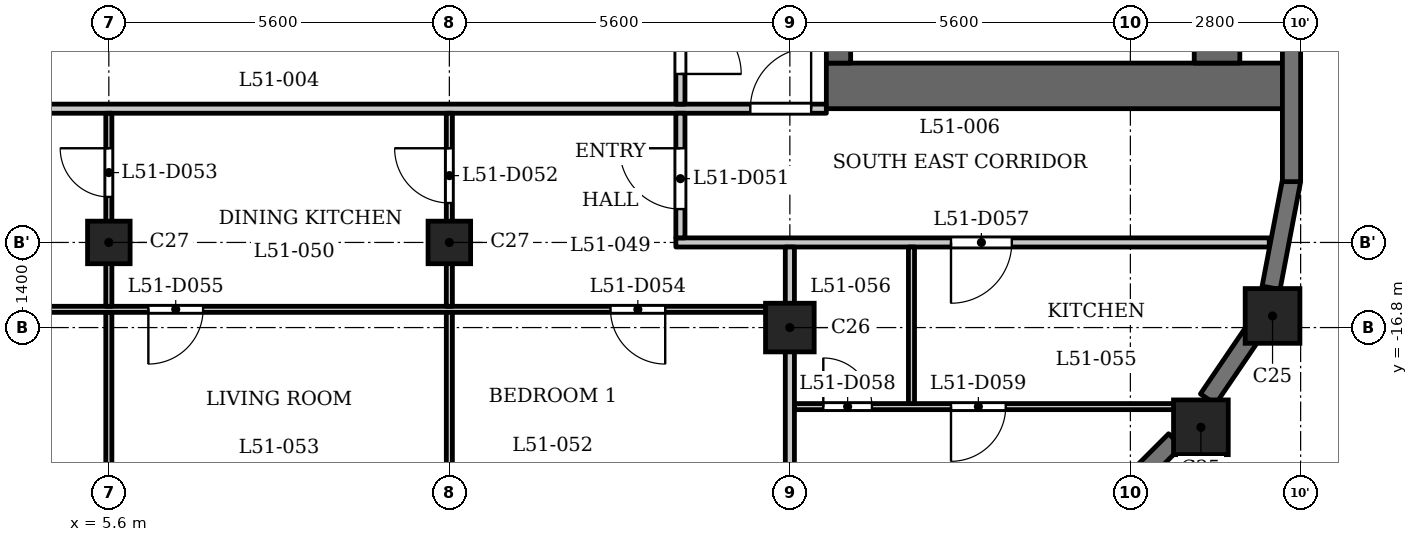
"""IFC4 building model, lengths in metres.
Left out: names, types, materials, properties, quantities, classifications, styles, units other than length and angle.
Written with IfcOpenShell. Run it as: python <this file> out.ifc"""

import sys

from ifc_helpers import new_model, si_unit, direction, frame, frame_2d, origin, origin_2d, place, context, subcontext, project, spatial, rectangle, extrude, element, fill, save


model = new_model("IFC4")
c1 = context("Model", 3, precision=1e-05, world=origin(), true_north=direction((0.0, 1.0)))
c2 = subcontext(c1, "Body", "Model", "MODEL_VIEW")
j1 = project(units=[si_unit("LENGTHUNIT", "METRE"), si_unit("PLANEANGLEUNIT", "RADIAN")], contexts=[c1])
p1 = place(None, origin())
s1 = spatial("IfcSite", under=j1, at=p1, CompositionType="ELEMENT")
p2 = place(p1, origin())
s2 = spatial("IfcBuilding", under=s1, at=p2, CompositionType="ELEMENT")
p3 = place(p2, frame((0.0, 0.0, 199.4)))
s3 = spatial("IfcBuildingStorey", under=s2, at=p3, CompositionType="ELEMENT", Elevation=199.4)
for number, where, z_axis, x_axis in (
    (1, (23.56, -18.44, 0.0), (0.0, 0.0, 1.0), (1.0, 0.0, 0.0)),
    (2, (24.738, -16.609, 0.0), (0.0, 0.0, 1.0), (1.0, 0.0, 0.0)),
):
    element("IfcColumn", number, at=place(p3, frame(where, z_axis=z_axis, x_axis=x_axis)), inside=s3, PredefinedType="COLUMN", context=c2, shape_type="SweptSolid", body=[
        extrude(rectangle(XDim=0.9, YDim=0.9, at=origin_2d()), origin(), (0.0, 0.0, 1.0), 3.5),
    ])
p4 = place(p3, frame((16.8, -16.8, 0.0), z_axis=(0.0, 0.0, 1.0), x_axis=(1.0, 0.0, 0.0)))
e3 = element("IfcColumn", 3, at=p4, inside=s3, PredefinedType="COLUMN", context=c2, shape_type="SweptSolid", body=[
    extrude(rectangle(XDim=0.8, YDim=0.8, at=origin_2d()), origin(), (0.0, 0.0, 1.0), 3.5),
])
for number, where, z_axis, x_axis in (
    (4, (5.6, -15.4, 0.0), (0.0, 0.0, 1.0), (1.0, 0.0, 0.0)),
    (5, (11.2, -15.4, 0.0), (0.0, 0.0, 1.0), (1.0, 0.0, 0.0)),
):
    element("IfcColumn", number, at=place(p3, frame(where, z_axis=z_axis, x_axis=x_axis)), inside=s3, PredefinedType="COLUMN", context=c2, shape_type="SweptSolid", body=[
        extrude(rectangle(XDim=0.7, YDim=0.7, at=origin_2d()), origin(), (0.0, 0.0, 1.0), 3.5),
    ])
p5 = place(p3, frame((21.191, -20.597, 0.0), z_axis=(0.0, 0.0, 1.0), x_axis=(0.707106781187, 0.707106781187, 0.0)))
e6 = element("IfcWall", 6, at=p5, inside=s3, PredefinedType="SOLIDWALL", context=c2, shape_type="SweptSolid", body=[
    extrude(rectangle(XDim=2.75, YDim=0.3, at=frame_2d((1.375, 0.0))), origin(), (0.0, 0.0, 1.0), 2.5),
])
p6 = place(p5, frame((0.775, 0.0, 0.6)))
e7 = element("IfcOpeningElement", 7, at=p6, cuts=e6, PredefinedType="OPENING", context=c2, shape_type="SweptSolid", body=[
    extrude(rectangle(XDim=1.2, YDim=1.55, at=frame_2d((0.6, 0.775))), frame((0.0, 0.16, 0.0), z_axis=(0.0, -1.0, 0.0), x_axis=(1.0, 0.0, 0.0)), (0.0, 0.0, 1.0), 0.32),
])
p7 = place(p3, frame((23.676, -17.975, 0.0), z_axis=(0.0, 0.0, 1.0), x_axis=(0.56200149592, 0.827136215253, 0.0)))
e8 = element("IfcWall", 8, at=p7, inside=s3, PredefinedType="SOLIDWALL", context=c2, shape_type="SweptSolid", body=[
    extrude(rectangle(XDim=1.277, YDim=0.3, at=frame_2d((0.639, 0.0))), origin(), (0.0, 0.0, 1.0), 2.5),
])
p8 = place(p3, frame((24.714, -16.146, 0.0), z_axis=(0.0, 0.0, 1.0), x_axis=(0.187348135549, 0.982293579388, 0.0)))
e9 = element("IfcWall", 9, at=p8, inside=s3, PredefinedType="SOLIDWALL", context=c2, shape_type="SweptSolid", body=[
    extrude(rectangle(XDim=1.806, YDim=0.3, at=frame_2d((0.903, 0.0))), origin(), (0.0, 0.0, 1.0), 2.5),
])
p9 = place(p3, frame((25.05, -14.4, 0.0), z_axis=(0.0, 0.0, 1.0), x_axis=(0.0, 1.0, 0.0)))
e10 = element("IfcWall", 10, at=p9, inside=s3, PredefinedType="SOLIDWALL", context=c2, shape_type="SweptSolid", body=[
    extrude(rectangle(XDim=2.75, YDim=0.3, at=frame_2d((1.375, 0.0))), origin(), (0.0, 0.0, 1.0), 2.5),
])
p10 = place(p3, frame((17.4, -12.825, 0.0), z_axis=(0.0, 0.0, 1.0), x_axis=(1.0, 0.0, 0.0)))
e11 = element("IfcWall", 11, at=p10, inside=s3, PredefinedType="SHEAR", context=c2, shape_type="SweptSolid", body=[
    extrude(rectangle(XDim=7.6, YDim=0.75, at=frame_2d((3.8, 0.0))), origin(), (0.0, 0.0, 1.0), 3.2),
])
p11 = place(p3, frame((17.6, -12.45, 0.0), z_axis=(0.0, 0.0, 1.0), x_axis=(0.0, 1.0, 0.0)))
e12 = element("IfcWall", 12, at=p11, inside=s3, PredefinedType="SHEAR", context=c2, shape_type="SweptSolid", body=[
    extrude(rectangle(XDim=24.9, YDim=0.4, at=frame_2d((12.45, 0.0))), origin(), (0.0, 0.0, 1.0), 3.2),
])
p12 = place(p11, frame((8.65, 0.0, 0.0)))
e13 = element("IfcOpeningElement", 13, at=p12, cuts=e12, PredefinedType="OPENING", context=c2, shape_type="SweptSolid", body=[
    extrude(rectangle(XDim=0.9, YDim=2.1, at=frame_2d((0.45, 1.05))), frame((0.0, 0.21, 0.0), z_axis=(0.0, -1.0, 0.0), x_axis=(1.0, 0.0, 0.0)), (0.0, 0.0, 1.0), 0.42),
])
p13 = place(p11, frame((15.6, 0.0, 0.0)))
e14 = element("IfcOpeningElement", 14, at=p13, cuts=e12, PredefinedType="OPENING", context=c2, shape_type="SweptSolid", body=[
    extrude(rectangle(XDim=1.1, YDim=2.1, at=frame_2d((0.55, 1.05))), frame((0.0, 0.21, 0.0), z_axis=(0.0, -1.0, 0.0), x_axis=(1.0, 0.0, 0.0)), (0.0, 0.0, 1.0), 0.42),
])
p14 = place(p11, frame((18.0, 0.0, 0.0)))
e15 = element("IfcOpeningElement", 15, at=p14, cuts=e12, PredefinedType="OPENING", context=c2, shape_type="SweptSolid", body=[
    extrude(rectangle(XDim=1.1, YDim=2.1, at=frame_2d((0.55, 1.05))), frame((0.0, 0.21, 0.0), z_axis=(0.0, -1.0, 0.0), x_axis=(1.0, 0.0, 0.0)), (0.0, 0.0, 1.0), 0.42),
])
p15 = place(p11, frame((23.025, 0.0, 0.0)))
e16 = element("IfcOpeningElement", 16, at=p15, cuts=e12, PredefinedType="OPENING", context=c2, shape_type="SweptSolid", body=[
    extrude(rectangle(XDim=1.1, YDim=2.1, at=frame_2d((0.55, 1.05))), frame((0.0, 0.21, 0.0), z_axis=(0.0, -1.0, 0.0), x_axis=(1.0, 0.0, 0.0)), (0.0, 0.0, 1.0), 0.42),
])
p16 = place(p11, frame((0.775, 0.0, 0.0)))
e17 = element("IfcOpeningElement", 17, at=p16, cuts=e12, PredefinedType="OPENING", context=c2, shape_type="SweptSolid", body=[
    extrude(rectangle(XDim=1.1, YDim=2.1, at=frame_2d((0.55, 1.05))), frame((0.0, 0.21, 0.0), z_axis=(0.0, -1.0, 0.0), x_axis=(1.0, 0.0, 0.0)), (0.0, 0.0, 1.0), 0.42),
])
p17 = place(p11, frame((12.925, 0.0, 0.0)))
e18 = element("IfcOpeningElement", 18, at=p17, cuts=e12, PredefinedType="OPENING", context=c2, shape_type="SweptSolid", body=[
    extrude(rectangle(XDim=1.8, YDim=2.1, at=frame_2d((0.9, 1.05))), frame((0.0, 0.21, 0.0), z_axis=(0.0, -1.0, 0.0), x_axis=(1.0, 0.0, 0.0)), (0.0, 0.0, 1.0), 0.42),
])
p18 = place(p3, frame((23.825, -12.45, 0.0), z_axis=(0.0, 0.0, 1.0), x_axis=(0.0, 1.0, 0.0)))
e19 = element("IfcWall", 19, at=p18, inside=s3, PredefinedType="SHEAR", context=c2, shape_type="SweptSolid", body=[
    extrude(rectangle(XDim=24.9, YDim=0.75, at=frame_2d((12.45, 0.0))), origin(), (0.0, 0.0, 1.0), 3.2),
])
p19 = place(p3, frame((16.875, -18.1, 0.0), z_axis=(0.0, 0.0, 1.0), x_axis=(1.0, 0.0, 0.0)))
e20 = element("IfcWall", 20, at=p19, inside=s3, PredefinedType="PARTITIONING", context=c2, shape_type="SweptSolid", body=[
    extrude(rectangle(XDim=6.765, YDim=0.1, at=frame_2d((3.382, 0.0))), origin(), (0.0, 0.0, 1.0), 3.2),
])
p20 = place(p19, frame((0.475, 0.0, 0.0)))
e21 = element("IfcOpeningElement", 21, at=p20, cuts=e20, PredefinedType="OPENING", context=c2, shape_type="SweptSolid", body=[
    extrude(rectangle(XDim=0.8, YDim=2.1, at=frame_2d((0.4, 1.05))), frame((0.0, 0.06, 0.0), z_axis=(0.0, -1.0, 0.0), x_axis=(1.0, 0.0, 0.0)), (0.0, 0.0, 1.0), 0.12),
])
p21 = place(p19, frame((2.575, 0.0, 0.0)))
e22 = element("IfcOpeningElement", 22, at=p21, cuts=e20, PredefinedType="OPENING", context=c2, shape_type="SweptSolid", body=[
    extrude(rectangle(XDim=0.9, YDim=2.1, at=frame_2d((0.45, 1.05))), frame((0.0, 0.06, 0.0), z_axis=(0.0, -1.0, 0.0), x_axis=(1.0, 0.0, 0.0)), (0.0, 0.0, 1.0), 0.12),
])
p22 = place(p3, frame((-16.725, -16.5, 0.0), z_axis=(0.0, 0.0, 1.0), x_axis=(1.0, 0.0, 0.0)))
e23 = element("IfcWall", 23, at=p22, inside=s3, PredefinedType="PARTITIONING", context=c2, shape_type="SweptSolid", body=[
    extrude(rectangle(XDim=33.45, YDim=0.1, at=frame_2d((16.725, 0.0))), origin(), (0.0, 0.0, 1.0), 3.2),
])
p23 = place(p22, frame((4.075, 0.0, 0.0)))
e24 = element("IfcOpeningElement", 24, at=p23, cuts=e23, PredefinedType="OPENING", context=c2, shape_type="SweptSolid", body=[
    extrude(rectangle(XDim=0.9, YDim=2.1, at=frame_2d((0.45, 1.05))), frame((0.0, 0.06, 0.0), z_axis=(0.0, -1.0, 0.0), x_axis=(1.0, 0.0, 0.0)), (0.0, 0.0, 1.0), 0.12),
])
p24 = place(p22, frame((6.175, 0.0, 0.0)))
e25 = element("IfcOpeningElement", 25, at=p24, cuts=e23, PredefinedType="OPENING", context=c2, shape_type="SweptSolid", body=[
    extrude(rectangle(XDim=0.9, YDim=2.1, at=frame_2d((0.45, 1.05))), frame((0.0, 0.06, 0.0), z_axis=(0.0, -1.0, 0.0), x_axis=(1.0, 0.0, 0.0)), (0.0, 0.0, 1.0), 0.12),
])
p25 = place(p22, frame((30.575, 0.0, 0.0)))
e26 = element("IfcOpeningElement", 26, at=p25, cuts=e23, PredefinedType="OPENING", context=c2, shape_type="SweptSolid", body=[
    extrude(rectangle(XDim=0.9, YDim=2.1, at=frame_2d((0.45, 1.05))), frame((0.0, 0.06, 0.0), z_axis=(0.0, -1.0, 0.0), x_axis=(1.0, 0.0, 0.0)), (0.0, 0.0, 1.0), 0.12),
])
p26 = place(p22, frame((22.975, 0.0, 0.0)))
e27 = element("IfcOpeningElement", 27, at=p26, cuts=e23, PredefinedType="OPENING", context=c2, shape_type="SweptSolid", body=[
    extrude(rectangle(XDim=0.9, YDim=2.1, at=frame_2d((0.45, 1.05))), frame((0.0, 0.06, 0.0), z_axis=(0.0, -1.0, 0.0), x_axis=(1.0, 0.0, 0.0)), (0.0, 0.0, 1.0), 0.12),
])
p27 = place(p3, frame((14.925, -15.4, 0.0), z_axis=(0.0, 0.0, 1.0), x_axis=(1.0, 0.0, 0.0)))
e28 = element("IfcWall", 28, at=p27, inside=s3, PredefinedType="PARTITIONING", context=c2, shape_type="SweptSolid", body=[
    extrude(rectangle(XDim=9.759, YDim=0.15, at=frame_2d((4.879, 0.0))), origin(), (0.0, 0.0, 1.0), 3.2),
])
p28 = place(p27, frame((4.525, 0.0, 0.0)))
e29 = element("IfcOpeningElement", 29, at=p28, cuts=e28, PredefinedType="OPENING", context=c2, shape_type="SweptSolid", body=[
    extrude(rectangle(XDim=1.0, YDim=2.1, at=frame_2d((0.5, 1.05))), frame((0.0, 0.085, 0.0), z_axis=(0.0, -1.0, 0.0), x_axis=(1.0, 0.0, 0.0)), (0.0, 0.0, 1.0), 0.17),
])
p29 = place(p3, frame((-17.4, -13.2, 0.0), z_axis=(0.0, 0.0, 1.0), x_axis=(1.0, 0.0, 0.0)))
e30 = element("IfcWall", 30, at=p29, inside=s3, PredefinedType="PARTITIONING", context=c2, shape_type="SweptSolid", body=[
    extrude(rectangle(XDim=34.8, YDim=0.15, at=frame_2d((17.4, 0.0))), origin(), (0.0, 0.0, 1.0), 3.2),
])
p30 = place(p29, frame((0.15, 0.0, 0.0)))
e31 = element("IfcOpeningElement", 31, at=p30, cuts=e30, PredefinedType="OPENING", context=c2, shape_type="SweptSolid", body=[
    extrude(rectangle(XDim=1.0, YDim=2.1, at=frame_2d((0.5, 1.05))), frame((0.0, 0.085, 0.0), z_axis=(0.0, -1.0, 0.0), x_axis=(1.0, 0.0, 0.0)), (0.0, 0.0, 1.0), 0.17),
])
p31 = place(p29, frame((33.55, 0.0, 0.0)))
e32 = element("IfcOpeningElement", 32, at=p31, cuts=e30, PredefinedType="OPENING", context=c2, shape_type="SweptSolid", body=[
    extrude(rectangle(XDim=1.0, YDim=2.1, at=frame_2d((0.5, 1.05))), frame((0.0, 0.085, 0.0), z_axis=(0.0, -1.0, 0.0), x_axis=(1.0, 0.0, 0.0)), (0.0, 0.0, 1.0), 0.17),
])
p32 = place(p3, frame((5.6, -22.08, 0.0), z_axis=(0.0, 0.0, 1.0), x_axis=(0.0, 1.0, 0.0)))
e33 = element("IfcWall", 33, at=p32, inside=s3, PredefinedType="PARTITIONING", context=c2, shape_type="SweptSolid", body=[
    extrude(rectangle(XDim=5.53, YDim=0.1, at=frame_2d((2.765, 0.0))), origin(), (0.0, 0.0, 1.0), 3.2),
])
p33 = place(p32, frame((0.28, 0.0, 0.0)))
e34 = element("IfcOpeningElement", 34, at=p33, cuts=e33, PredefinedType="OPENING", context=c2, shape_type="SweptSolid", body=[
    extrude(rectangle(XDim=0.9, YDim=2.1, at=frame_2d((0.45, 1.05))), frame((0.0, 0.06, 0.0), z_axis=(0.0, -1.0, 0.0), x_axis=(1.0, 0.0, 0.0)), (0.0, 0.0, 1.0), 0.12),
])
p34 = place(p3, frame((5.6, -16.45, 0.0), z_axis=(0.0, 0.0, 1.0), x_axis=(0.0, 1.0, 0.0)))
e35 = element("IfcWall", 35, at=p34, inside=s3, PredefinedType="PARTITIONING", context=c2, shape_type="SweptSolid", body=[
    extrude(rectangle(XDim=3.175, YDim=0.1, at=frame_2d((1.587, 0.0))), origin(), (0.0, 0.0, 1.0), 3.2),
])
p35 = place(p34, frame((1.799, 0.0, 0.0)))
e36 = element("IfcOpeningElement", 36, at=p35, cuts=e35, PredefinedType="OPENING", context=c2, shape_type="SweptSolid", body=[
    extrude(rectangle(XDim=0.8, YDim=2.1, at=frame_2d((0.4, 1.05))), frame((0.0, 0.06, 0.0), z_axis=(0.0, -1.0, 0.0), x_axis=(1.0, 0.0, 0.0)), (0.0, 0.0, 1.0), 0.12),
])
p36 = place(p3, frame((11.2, -22.08, 0.0), z_axis=(0.0, 0.0, 1.0), x_axis=(0.0, 1.0, 0.0)))
e37 = element("IfcWall", 37, at=p36, inside=s3, PredefinedType="PARTITIONING", context=c2, shape_type="SweptSolid", body=[
    extrude(rectangle(XDim=5.53, YDim=0.1, at=frame_2d((2.765, 0.0))), origin(), (0.0, 0.0, 1.0), 3.2),
])
p37 = place(p3, frame((11.2, -16.45, 0.0), z_axis=(0.0, 0.0, 1.0), x_axis=(0.0, 1.0, 0.0)))
e38 = element("IfcWall", 38, at=p37, inside=s3, PredefinedType="PARTITIONING", context=c2, shape_type="SweptSolid", body=[
    extrude(rectangle(XDim=3.175, YDim=0.1, at=frame_2d((1.587, 0.0))), origin(), (0.0, 0.0, 1.0), 3.2),
])
p38 = place(p37, frame((1.699, 0.0, 0.0)))
e39 = element("IfcOpeningElement", 39, at=p38, cuts=e38, PredefinedType="OPENING", context=c2, shape_type="SweptSolid", body=[
    extrude(rectangle(XDim=0.9, YDim=2.1, at=frame_2d((0.45, 1.05))), frame((0.0, 0.06, 0.0), z_axis=(0.0, -1.0, 0.0), x_axis=(1.0, 0.0, 0.0)), (0.0, 0.0, 1.0), 0.12),
])
p39 = place(p3, frame((15.0, -15.325, 0.0), z_axis=(0.0, 0.0, 1.0), x_axis=(0.0, 1.0, 0.0)))
e40 = element("IfcWall", 40, at=p39, inside=s3, PredefinedType="PARTITIONING", context=c2, shape_type="SweptSolid", body=[
    extrude(rectangle(XDim=2.05, YDim=0.15, at=frame_2d((1.025, 0.0))), origin(), (0.0, 0.0, 1.0), 3.2),
])
p40 = place(p39, frame((0.474, 0.0, 0.0)))
e41 = element("IfcOpeningElement", 41, at=p40, cuts=e40, PredefinedType="OPENING", context=c2, shape_type="SweptSolid", body=[
    extrude(rectangle(XDim=1.0, YDim=2.1, at=frame_2d((0.5, 1.05))), frame((0.0, 0.085, 0.0), z_axis=(0.0, -1.0, 0.0), x_axis=(1.0, 0.0, 0.0)), (0.0, 0.0, 1.0), 0.17),
])
p41 = place(p3, frame((15.0, -13.125, 0.0), z_axis=(0.0, 0.0, 1.0), x_axis=(0.0, 1.0, 0.0)))
e42 = element("IfcWall", 42, at=p41, inside=s3, PredefinedType="PARTITIONING", context=c2, shape_type="SweptSolid", body=[
    extrude(rectangle(XDim=6.356, YDim=0.15, at=frame_2d((3.178, 0.0))), origin(), (0.0, 0.0, 1.0), 3.2),
])
p42 = place(p41, frame((0.496, 0.0, 0.0)))
e43 = element("IfcOpeningElement", 43, at=p42, cuts=e42, PredefinedType="OPENING", context=c2, shape_type="SweptSolid", body=[
    extrude(rectangle(XDim=1.0, YDim=2.1, at=frame_2d((0.5, 1.05))), frame((0.0, 0.085, 0.0), z_axis=(0.0, -1.0, 0.0), x_axis=(1.0, 0.0, 0.0)), (0.0, 0.0, 1.0), 0.17),
])
p43 = place(p3, frame((16.8, -22.31, 0.0), z_axis=(0.0, 0.0, 1.0), x_axis=(0.0, 1.0, 0.0)))
e44 = element("IfcWall", 44, at=p43, inside=s3, PredefinedType="PARTITIONING", context=c2, shape_type="SweptSolid", body=[
    extrude(rectangle(XDim=6.835, YDim=0.15, at=frame_2d((3.417, 0.0))), origin(), (0.0, 0.0, 1.0), 2.55),
])
p44 = place(p3, frame((18.8, -18.05, 0.0), z_axis=(0.0, 0.0, 1.0), x_axis=(0.0, 1.0, 0.0)))
e45 = element("IfcWall", 45, at=p44, inside=s3, PredefinedType="PARTITIONING", context=c2, shape_type="SweptSolid", body=[
    extrude(rectangle(XDim=2.575, YDim=0.1, at=frame_2d((1.288, 0.0))), origin(), (0.0, 0.0, 1.0), 3.2),
])
p45 = place(p42, origin())
e46 = element("IfcDoor", 46, at=p45, inside=s3, OperationType="SINGLE_SWING_LEFT", PredefinedType="DOOR", context=c2, shape_type="SweptSolid", body=[
    extrude(rectangle(XDim=1.0, YDim=2.1, at=frame_2d((0.5, 1.05))), frame((0.0, 0.025, 0.0), z_axis=(0.0, -1.0, 0.0), x_axis=(1.0, 0.0, 0.0)), (0.0, 0.0, 1.0), 0.05),
])
fill(e43, e46)
p46 = place(p31, origin())
e47 = element("IfcDoor", 47, at=p46, inside=s3, OperationType="SINGLE_SWING_LEFT", PredefinedType="DOOR", context=c2, shape_type="SweptSolid", body=[
    extrude(rectangle(XDim=1.0, YDim=2.1, at=frame_2d((0.5, 1.05))), frame((0.0, 0.025, 0.0), z_axis=(0.0, -1.0, 0.0), x_axis=(1.0, 0.0, 0.0)), (0.0, 0.0, 1.0), 0.05),
])
fill(e32, e47)
p47 = place(p40, origin())
e48 = element("IfcDoor", 48, at=p47, inside=s3, OperationType="SINGLE_SWING_LEFT", PredefinedType="DOOR", context=c2, shape_type="SweptSolid", body=[
    extrude(rectangle(XDim=1.0, YDim=2.1, at=frame_2d((0.5, 1.05))), frame((0.0, 0.025, 0.0), z_axis=(0.0, -1.0, 0.0), x_axis=(1.0, 0.0, 0.0)), (0.0, 0.0, 1.0), 0.05),
])
fill(e41, e48)
p48 = place(p38, origin())
e49 = element("IfcDoor", 49, at=p48, inside=s3, OperationType="SINGLE_SWING_LEFT", PredefinedType="DOOR", context=c2, shape_type="SweptSolid", body=[
    extrude(rectangle(XDim=0.9, YDim=2.1, at=frame_2d((0.45, 1.05))), frame((0.0, 0.025, 0.0), z_axis=(0.0, -1.0, 0.0), x_axis=(1.0, 0.0, 0.0)), (0.0, 0.0, 1.0), 0.05),
])
fill(e39, e49)
p49 = place(p35, origin())
e50 = element("IfcDoor", 50, at=p49, inside=s3, OperationType="SINGLE_SWING_LEFT", PredefinedType="DOOR", context=c2, shape_type="SweptSolid", body=[
    extrude(rectangle(XDim=0.8, YDim=2.1, at=frame_2d((0.4, 1.05))), frame((0.0, 0.025, 0.0), z_axis=(0.0, -1.0, 0.0), x_axis=(1.0, 0.0, 0.0)), (0.0, 0.0, 1.0), 0.05),
])
fill(e36, e50)
p50 = place(p25, origin())
e51 = element("IfcDoor", 51, at=p50, inside=s3, OperationType="SINGLE_SWING_RIGHT", PredefinedType="DOOR", context=c2, shape_type="SweptSolid", body=[
    extrude(rectangle(XDim=0.9, YDim=2.1, at=frame_2d((0.45, 1.05))), frame((0.0, 0.025, 0.0), z_axis=(0.0, -1.0, 0.0), x_axis=(1.0, 0.0, 0.0)), (0.0, 0.0, 1.0), 0.05),
])
fill(e26, e51)
p51 = place(p26, origin())
e52 = element("IfcDoor", 52, at=p51, inside=s3, OperationType="SINGLE_SWING_LEFT", PredefinedType="DOOR", context=c2, shape_type="SweptSolid", body=[
    extrude(rectangle(XDim=0.9, YDim=2.1, at=frame_2d((0.45, 1.05))), frame((0.0, 0.025, 0.0), z_axis=(0.0, -1.0, 0.0), x_axis=(1.0, 0.0, 0.0)), (0.0, 0.0, 1.0), 0.05),
])
fill(e27, e52)
p52 = place(p28, origin())
e53 = element("IfcDoor", 53, at=p52, inside=s3, OperationType="SINGLE_SWING_LEFT", PredefinedType="DOOR", context=c2, shape_type="SweptSolid", body=[
    extrude(rectangle(XDim=1.0, YDim=2.1, at=frame_2d((0.5, 1.05))), frame((0.0, 0.025, 0.0), z_axis=(0.0, -1.0, 0.0), x_axis=(1.0, 0.0, 0.0)), (0.0, 0.0, 1.0), 0.05),
])
fill(e29, e53)
p53 = place(p20, origin())
e54 = element("IfcDoor", 54, at=p53, inside=s3, OperationType="SINGLE_SWING_RIGHT", PredefinedType="DOOR", context=c2, shape_type="SweptSolid", body=[
    extrude(rectangle(XDim=0.8, YDim=2.1, at=frame_2d((0.4, 1.05))), frame((0.0, 0.025, 0.0), z_axis=(0.0, -1.0, 0.0), x_axis=(1.0, 0.0, 0.0)), (0.0, 0.0, 1.0), 0.05),
])
fill(e21, e54)
p54 = place(p21, origin())
e55 = element("IfcDoor", 55, at=p54, inside=s3, OperationType="SINGLE_SWING_LEFT", PredefinedType="DOOR", context=c2, shape_type="SweptSolid", body=[
    extrude(rectangle(XDim=0.9, YDim=2.1, at=frame_2d((0.45, 1.05))), frame((0.0, 0.025, 0.0), z_axis=(0.0, -1.0, 0.0), x_axis=(1.0, 0.0, 0.0)), (0.0, 0.0, 1.0), 0.05),
])
fill(e22, e55)
save(model, sys.argv[1])
